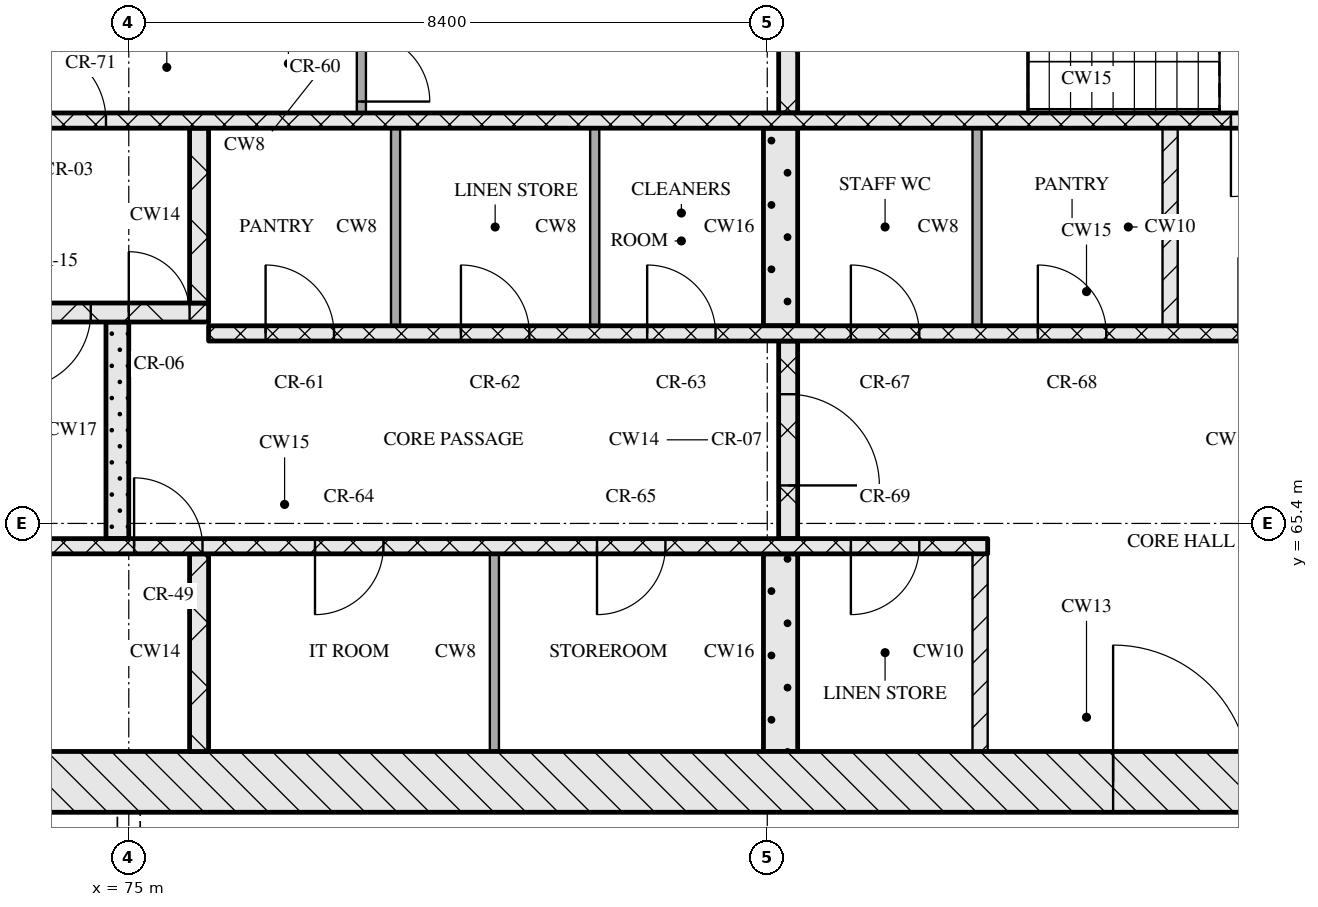
"""IFC4 building model, lengths in metres.
Left out: names, types, materials, properties, quantities, classifications, styles, units other than length and angle.
Written with IfcOpenShell. Run it as: python <this file> out.ifc"""

import sys

from ifc_helpers import new_model, si_unit, direction, frame, frame_2d, origin, place, context, subcontext, project, spatial, rectangle, extrude, element, fill, save


model = new_model("IFC4")
c1 = context("Model", 3, precision=1e-05, world=origin(), true_north=direction((0.0, 1.0)))
c2 = subcontext(c1, "Body", "Model", "MODEL_VIEW")
j1 = project(units=[si_unit("LENGTHUNIT", "METRE"), si_unit("PLANEANGLEUNIT", "RADIAN")], contexts=[c1])
p1 = place(None, origin())
s1 = spatial("IfcSite", under=j1, at=p1, CompositionType="ELEMENT")
p2 = place(p1, origin())
s2 = spatial("IfcBuilding", under=s1, at=p2, CompositionType="ELEMENT")
p3 = place(p2, frame((0.0, 0.0, 183.45)))
s3 = spatial("IfcBuildingStorey", under=s2, at=p3, CompositionType="ELEMENT", Elevation=183.45)
p4 = place(p3, frame((67.0, 62.0, 0.0), z_axis=(0.0, 0.0, 1.0), x_axis=(1.0, 0.0, 0.0)))
e1 = element("IfcWall", 1, at=p4, inside=s3, PredefinedType="SOLIDWALL", context=c2, shape_type="SweptSolid", body=[
    extrude(rectangle(XDim=41.2, YDim=0.8, at=frame_2d((20.6, 0.0))), origin(), (0.0, 0.0, 1.0), 3.32),
])
p5 = place(p4, frame((20.95, 0.0, 0.0)))
e2 = element("IfcOpeningElement", 2, at=p5, cuts=e1, PredefinedType="OPENING", context=c2, shape_type="SweptSolid", body=[
    extrude(rectangle(XDim=1.8, YDim=2.1, at=frame_2d((0.9, 1.05))), frame((0.0, 0.41, 0.0), z_axis=(0.0, -1.0, 0.0), x_axis=(1.0, 0.0, 0.0)), (0.0, 0.0, 1.0), 0.82),
])
p6 = place(p3, frame((75.925, 62.4, 0.0), z_axis=(0.0, 0.0, 1.0), x_axis=(0.0, 1.0, 0.0)))
e3 = element("IfcWall", 3, at=p6, inside=s3, PredefinedType="SOLIDWALL", context=c2, shape_type="SweptSolid", body=[
    extrude(rectangle(XDim=2.6, YDim=0.25, at=frame_2d((1.3, 0.0))), origin(), (0.0, 0.0, 1.0), 3.32),
])
p7 = place(p3, frame((79.81, 62.4, 0.0), z_axis=(0.0, 0.0, 1.0), x_axis=(0.0, 1.0, 0.0)))
e4 = element("IfcWall", 4, at=p7, inside=s3, PredefinedType="PARTITIONING", context=c2, shape_type="SweptSolid", body=[
    extrude(rectangle(XDim=2.6, YDim=0.12, at=frame_2d((1.3, 0.0))), origin(), (0.0, 0.0, 1.0), 3.32),
])
p8 = place(p3, frame((83.575, 62.4, 0.0), z_axis=(0.0, 0.0, 1.0), x_axis=(0.0, 1.0, 0.0)))
e5 = element("IfcWall", 5, at=p8, inside=s3, PredefinedType="SOLIDWALL", context=c2, shape_type="SweptSolid", body=[
    extrude(rectangle(XDim=2.6, YDim=0.45, at=frame_2d((1.3, 0.0))), origin(), (0.0, 0.0, 1.0), 3.32),
])
p9 = place(p3, frame((86.2, 62.4, 0.0), z_axis=(0.0, 0.0, 1.0), x_axis=(0.0, 1.0, 0.0)))
e6 = element("IfcWall", 6, at=p9, inside=s3, PredefinedType="PARTITIONING", context=c2, shape_type="SweptSolid", body=[
    extrude(rectangle(XDim=2.6, YDim=0.2, at=frame_2d((1.3, 0.0))), origin(), (0.0, 0.0, 1.0), 3.32),
])
p10 = place(p3, frame((67.8, 65.1, 0.0), z_axis=(0.0, 0.0, 1.0), x_axis=(1.0, 0.0, 0.0)))
e7 = element("IfcWall", 7, at=p10, inside=s3, PredefinedType="SOLIDWALL", context=c2, shape_type="SweptSolid", body=[
    extrude(rectangle(XDim=18.5, YDim=0.2, at=frame_2d((9.25, 0.0))), origin(), (0.0, 0.0, 1.0), 3.32),
])
p11 = place(p10, frame((7.27, 0.0, 0.0)))
e8 = element("IfcOpeningElement", 8, at=p11, cuts=e7, PredefinedType="OPENING", context=c2, shape_type="SweptSolid", body=[
    extrude(rectangle(XDim=0.9, YDim=2.1, at=frame_2d((0.45, 1.05))), frame((0.0, 0.11, 0.0), z_axis=(0.0, -1.0, 0.0), x_axis=(1.0, 0.0, 0.0)), (0.0, 0.0, 1.0), 0.22),
])
p12 = place(p10, frame((9.65, 0.0, 0.0)))
e9 = element("IfcOpeningElement", 9, at=p12, cuts=e7, PredefinedType="OPENING", context=c2, shape_type="SweptSolid", body=[
    extrude(rectangle(XDim=0.9, YDim=2.1, at=frame_2d((0.45, 1.05))), frame((0.0, 0.11, 0.0), z_axis=(0.0, -1.0, 0.0), x_axis=(1.0, 0.0, 0.0)), (0.0, 0.0, 1.0), 0.22),
])
p13 = place(p10, frame((13.36, 0.0, 0.0)))
e10 = element("IfcOpeningElement", 10, at=p13, cuts=e7, PredefinedType="OPENING", context=c2, shape_type="SweptSolid", body=[
    extrude(rectangle(XDim=0.9, YDim=2.1, at=frame_2d((0.45, 1.05))), frame((0.0, 0.11, 0.0), z_axis=(0.0, -1.0, 0.0), x_axis=(1.0, 0.0, 0.0)), (0.0, 0.0, 1.0), 0.22),
])
p14 = place(p10, frame((16.7, 0.0, 0.0)))
e11 = element("IfcOpeningElement", 11, at=p14, cuts=e7, PredefinedType="OPENING", context=c2, shape_type="SweptSolid", body=[
    extrude(rectangle(XDim=0.9, YDim=2.1, at=frame_2d((0.45, 1.05))), frame((0.0, 0.11, 0.0), z_axis=(0.0, -1.0, 0.0), x_axis=(1.0, 0.0, 0.0)), (0.0, 0.0, 1.0), 0.22),
])
p15 = place(p3, frame((74.85, 65.2, 0.0), z_axis=(0.0, 0.0, 1.0), x_axis=(0.0, 1.0, 0.0)))
e12 = element("IfcWall", 12, at=p15, inside=s3, PredefinedType="SOLIDWALL", context=c2, shape_type="SweptSolid", body=[
    extrude(rectangle(XDim=2.85, YDim=0.3, at=frame_2d((1.425, 0.0))), origin(), (0.0, 0.0, 1.0), 3.32),
])
p16 = place(p3, frame((83.675, 65.2, 0.0), z_axis=(0.0, 0.0, 1.0), x_axis=(0.0, 1.0, 0.0)))
e13 = element("IfcWall", 13, at=p16, inside=s3, PredefinedType="SOLIDWALL", context=c2, shape_type="SweptSolid", body=[
    extrude(rectangle(XDim=2.6, YDim=0.25, at=frame_2d((1.3, 0.0))), origin(), (0.0, 0.0, 1.0), 3.32),
])
p17 = place(p16, frame((0.7, 0.0, 0.0)))
e14 = element("IfcOpeningElement", 14, at=p17, cuts=e13, PredefinedType="OPENING", context=c2, shape_type="SweptSolid", body=[
    extrude(rectangle(XDim=1.2, YDim=2.1, at=frame_2d((0.6, 1.05))), frame((0.0, 0.135, 0.0), z_axis=(0.0, -1.0, 0.0), x_axis=(1.0, 0.0, 0.0)), (0.0, 0.0, 1.0), 0.27),
])
p18 = place(p3, frame((76.05, 67.9, 0.0), z_axis=(0.0, 0.0, 1.0), x_axis=(1.0, 0.0, 0.0)))
e15 = element("IfcWall", 15, at=p18, inside=s3, PredefinedType="SOLIDWALL", context=c2, shape_type="SweptSolid", body=[
    extrude(rectangle(XDim=23.1, YDim=0.2, at=frame_2d((11.55, 0.0))), origin(), (0.0, 0.0, 1.0), 3.32),
])
p19 = place(p18, frame((0.75, 0.0, 0.0)))
e16 = element("IfcOpeningElement", 16, at=p19, cuts=e15, PredefinedType="OPENING", context=c2, shape_type="SweptSolid", body=[
    extrude(rectangle(XDim=0.9, YDim=2.1, at=frame_2d((0.45, 1.05))), frame((0.0, 0.11, 0.0), z_axis=(0.0, -1.0, 0.0), x_axis=(1.0, 0.0, 0.0)), (0.0, 0.0, 1.0), 0.22),
])
p20 = place(p18, frame((3.32, 0.0, 0.0)))
e17 = element("IfcOpeningElement", 17, at=p20, cuts=e15, PredefinedType="OPENING", context=c2, shape_type="SweptSolid", body=[
    extrude(rectangle(XDim=0.9, YDim=2.1, at=frame_2d((0.45, 1.05))), frame((0.0, 0.11, 0.0), z_axis=(0.0, -1.0, 0.0), x_axis=(1.0, 0.0, 0.0)), (0.0, 0.0, 1.0), 0.22),
])
p21 = place(p18, frame((5.77, 0.0, 0.0)))
e18 = element("IfcOpeningElement", 18, at=p21, cuts=e15, PredefinedType="OPENING", context=c2, shape_type="SweptSolid", body=[
    extrude(rectangle(XDim=0.9, YDim=2.1, at=frame_2d((0.45, 1.05))), frame((0.0, 0.11, 0.0), z_axis=(0.0, -1.0, 0.0), x_axis=(1.0, 0.0, 0.0)), (0.0, 0.0, 1.0), 0.22),
])
p22 = place(p18, frame((8.45, 0.0, 0.0)))
e19 = element("IfcOpeningElement", 19, at=p22, cuts=e15, PredefinedType="OPENING", context=c2, shape_type="SweptSolid", body=[
    extrude(rectangle(XDim=0.9, YDim=2.1, at=frame_2d((0.45, 1.05))), frame((0.0, 0.11, 0.0), z_axis=(0.0, -1.0, 0.0), x_axis=(1.0, 0.0, 0.0)), (0.0, 0.0, 1.0), 0.22),
])
p23 = place(p18, frame((10.91, 0.0, 0.0)))
e20 = element("IfcOpeningElement", 20, at=p23, cuts=e15, PredefinedType="OPENING", context=c2, shape_type="SweptSolid", body=[
    extrude(rectangle(XDim=0.9, YDim=2.1, at=frame_2d((0.45, 1.05))), frame((0.0, 0.11, 0.0), z_axis=(0.0, -1.0, 0.0), x_axis=(1.0, 0.0, 0.0)), (0.0, 0.0, 1.0), 0.22),
])
p24 = place(p18, frame((13.55, 0.0, 0.0)))
e21 = element("IfcOpeningElement", 21, at=p24, cuts=e15, PredefinedType="OPENING", context=c2, shape_type="SweptSolid", body=[
    extrude(rectangle(XDim=1.0, YDim=2.1, at=frame_2d((0.5, 1.05))), frame((0.0, 0.11, 0.0), z_axis=(0.0, -1.0, 0.0), x_axis=(1.0, 0.0, 0.0)), (0.0, 0.0, 1.0), 0.22),
])
p25 = place(p18, frame((16.2, 0.0, 0.0)))
e22 = element("IfcOpeningElement", 22, at=p25, cuts=e15, PredefinedType="OPENING", context=c2, shape_type="SweptSolid", body=[
    extrude(rectangle(XDim=1.1, YDim=2.1, at=frame_2d((0.55, 1.05))), frame((0.0, 0.11, 0.0), z_axis=(0.0, -1.0, 0.0), x_axis=(1.0, 0.0, 0.0)), (0.0, 0.0, 1.0), 0.22),
])
p26 = place(p18, frame((18.7, 0.0, 0.0)))
e23 = element("IfcOpeningElement", 23, at=p26, cuts=e15, PredefinedType="OPENING", context=c2, shape_type="SweptSolid", body=[
    extrude(rectangle(XDim=1.1, YDim=2.1, at=frame_2d((0.55, 1.05))), frame((0.0, 0.11, 0.0), z_axis=(0.0, -1.0, 0.0), x_axis=(1.0, 0.0, 0.0)), (0.0, 0.0, 1.0), 0.22),
])
p27 = place(p18, frame((21.2, 0.0, 0.0)))
e24 = element("IfcOpeningElement", 24, at=p27, cuts=e15, PredefinedType="OPENING", context=c2, shape_type="SweptSolid", body=[
    extrude(rectangle(XDim=1.1, YDim=2.1, at=frame_2d((0.55, 1.05))), frame((0.0, 0.11, 0.0), z_axis=(0.0, -1.0, 0.0), x_axis=(1.0, 0.0, 0.0)), (0.0, 0.0, 1.0), 0.22),
])
for number, where, z_axis, x_axis in (
    (25, (78.51, 68.0, 0.0), (0.0, 0.0, 1.0), (0.0, 1.0, 0.0)),
    (26, (81.13, 68.0, 0.0), (0.0, 0.0, 1.0), (0.0, 1.0, 0.0)),
):
    element("IfcWall", number, at=place(p3, frame(where, z_axis=z_axis, x_axis=x_axis)), inside=s3, PredefinedType="PARTITIONING", context=c2, shape_type="SweptSolid", body=[
        extrude(rectangle(XDim=2.6, YDim=0.12, at=frame_2d((1.3, 0.0))), origin(), (0.0, 0.0, 1.0), 3.32),
    ])
p28 = place(p3, frame((83.575, 68.0, 0.0), z_axis=(0.0, 0.0, 1.0), x_axis=(0.0, 1.0, 0.0)))
e27 = element("IfcWall", 27, at=p28, inside=s3, PredefinedType="SOLIDWALL", context=c2, shape_type="SweptSolid", body=[
    extrude(rectangle(XDim=2.6, YDim=0.45, at=frame_2d((1.3, 0.0))), origin(), (0.0, 0.0, 1.0), 3.32),
])
p29 = place(p3, frame((86.16, 68.0, 0.0), z_axis=(0.0, 0.0, 1.0), x_axis=(0.0, 1.0, 0.0)))
e28 = element("IfcWall", 28, at=p29, inside=s3, PredefinedType="PARTITIONING", context=c2, shape_type="SweptSolid", body=[
    extrude(rectangle(XDim=2.6, YDim=0.12, at=frame_2d((1.3, 0.0))), origin(), (0.0, 0.0, 1.0), 3.32),
])
p30 = place(p3, frame((88.7, 68.0, 0.0), z_axis=(0.0, 0.0, 1.0), x_axis=(0.0, 1.0, 0.0)))
e29 = element("IfcWall", 29, at=p30, inside=s3, PredefinedType="PARTITIONING", context=c2, shape_type="SweptSolid", body=[
    extrude(rectangle(XDim=2.6, YDim=0.2, at=frame_2d((1.3, 0.0))), origin(), (0.0, 0.0, 1.0), 3.32),
])
p31 = place(p3, frame((67.8, 68.175, 0.0), z_axis=(0.0, 0.0, 1.0), x_axis=(1.0, 0.0, 0.0)))
e30 = element("IfcWall", 30, at=p31, inside=s3, PredefinedType="SOLIDWALL", context=c2, shape_type="SweptSolid", body=[
    extrude(rectangle(XDim=8.25, YDim=0.25, at=frame_2d((4.125, 0.0))), origin(), (0.0, 0.0, 1.0), 3.32),
])
p32 = place(p31, frame((5.7, 0.0, 0.0)))
e31 = element("IfcOpeningElement", 31, at=p32, cuts=e30, PredefinedType="OPENING", context=c2, shape_type="SweptSolid", body=[
    extrude(rectangle(XDim=1.0, YDim=2.1, at=frame_2d((0.5, 1.05))), frame((0.0, 0.135, 0.0), z_axis=(0.0, -1.0, 0.0), x_axis=(1.0, 0.0, 0.0)), (0.0, 0.0, 1.0), 0.27),
])
p33 = place(p31, frame((7.2, 0.0, 0.0)))
e32 = element("IfcOpeningElement", 32, at=p33, cuts=e30, PredefinedType="OPENING", context=c2, shape_type="SweptSolid", body=[
    extrude(rectangle(XDim=0.8, YDim=2.1, at=frame_2d((0.4, 1.05))), frame((0.0, 0.135, 0.0), z_axis=(0.0, -1.0, 0.0), x_axis=(1.0, 0.0, 0.0)), (0.0, 0.0, 1.0), 0.27),
])
p34 = place(p3, frame((75.925, 68.3, 0.0), z_axis=(0.0, 0.0, 1.0), x_axis=(0.0, 1.0, 0.0)))
e33 = element("IfcWall", 33, at=p34, inside=s3, PredefinedType="SOLIDWALL", context=c2, shape_type="SweptSolid", body=[
    extrude(rectangle(XDim=2.3, YDim=0.25, at=frame_2d((1.15, 0.0))), origin(), (0.0, 0.0, 1.0), 3.32),
])
p35 = place(p3, frame((67.8, 70.7, 0.0), z_axis=(0.0, 0.0, 1.0), x_axis=(1.0, 0.0, 0.0)))
e34 = element("IfcWall", 34, at=p35, inside=s3, PredefinedType="SOLIDWALL", context=c2, shape_type="SweptSolid", body=[
    extrude(rectangle(XDim=39.6, YDim=0.2, at=frame_2d((19.8, 0.0))), origin(), (0.0, 0.0, 1.0), 3.32),
])
p36 = place(p35, frame((0.65, 0.0, 0.0)))
e35 = element("IfcOpeningElement", 35, at=p36, cuts=e34, PredefinedType="OPENING", context=c2, shape_type="SweptSolid", body=[
    extrude(rectangle(XDim=1.1, YDim=2.1, at=frame_2d((0.55, 1.05))), frame((0.0, 0.11, 0.0), z_axis=(0.0, -1.0, 0.0), x_axis=(1.0, 0.0, 0.0)), (0.0, 0.0, 1.0), 0.22),
])
p37 = place(p35, frame((3.25, 0.0, 0.0)))
e36 = element("IfcOpeningElement", 36, at=p37, cuts=e34, PredefinedType="OPENING", context=c2, shape_type="SweptSolid", body=[
    extrude(rectangle(XDim=1.1, YDim=2.1, at=frame_2d((0.55, 1.05))), frame((0.0, 0.11, 0.0), z_axis=(0.0, -1.0, 0.0), x_axis=(1.0, 0.0, 0.0)), (0.0, 0.0, 1.0), 0.22),
])
p38 = place(p35, frame((5.9, 0.0, 0.0)))
e37 = element("IfcOpeningElement", 37, at=p38, cuts=e34, PredefinedType="OPENING", context=c2, shape_type="SweptSolid", body=[
    extrude(rectangle(XDim=1.0, YDim=2.1, at=frame_2d((0.5, 1.05))), frame((0.0, 0.11, 0.0), z_axis=(0.0, -1.0, 0.0), x_axis=(1.0, 0.0, 0.0)), (0.0, 0.0, 1.0), 0.22),
])
p39 = place(p35, frame((21.7, 0.0, 0.0)))
e38 = element("IfcOpeningElement", 38, at=p39, cuts=e34, PredefinedType="OPENING", context=c2, shape_type="SweptSolid", body=[
    extrude(rectangle(XDim=1.0, YDim=2.1, at=frame_2d((0.5, 1.05))), frame((0.0, 0.11, 0.0), z_axis=(0.0, -1.0, 0.0), x_axis=(1.0, 0.0, 0.0)), (0.0, 0.0, 1.0), 0.22),
])
p40 = place(p35, frame((32.7, 0.0, 0.0)))
e39 = element("IfcOpeningElement", 39, at=p40, cuts=e34, PredefinedType="OPENING", context=c2, shape_type="SweptSolid", body=[
    extrude(rectangle(XDim=1.0, YDim=2.1, at=frame_2d((0.5, 1.05))), frame((0.0, 0.11, 0.0), z_axis=(0.0, -1.0, 0.0), x_axis=(1.0, 0.0, 0.0)), (0.0, 0.0, 1.0), 0.22),
])
p41 = place(p35, frame((35.25, 0.0, 0.0)))
e40 = element("IfcOpeningElement", 40, at=p41, cuts=e34, PredefinedType="OPENING", context=c2, shape_type="SweptSolid", body=[
    extrude(rectangle(XDim=1.1, YDim=2.1, at=frame_2d((0.55, 1.05))), frame((0.0, 0.11, 0.0), z_axis=(0.0, -1.0, 0.0), x_axis=(1.0, 0.0, 0.0)), (0.0, 0.0, 1.0), 0.22),
])
p42 = place(p35, frame((37.85, 0.0, 0.0)))
e41 = element("IfcOpeningElement", 41, at=p42, cuts=e34, PredefinedType="OPENING", context=c2, shape_type="SweptSolid", body=[
    extrude(rectangle(XDim=1.1, YDim=2.1, at=frame_2d((0.55, 1.05))), frame((0.0, 0.11, 0.0), z_axis=(0.0, -1.0, 0.0), x_axis=(1.0, 0.0, 0.0)), (0.0, 0.0, 1.0), 0.22),
])
p43 = place(p3, frame((78.06, 70.8, 0.0), z_axis=(0.0, 0.0, 1.0), x_axis=(0.0, 1.0, 0.0)))
e42 = element("IfcWall", 42, at=p43, inside=s3, PredefinedType="PARTITIONING", context=c2, shape_type="SweptSolid", body=[
    extrude(rectangle(XDim=1.2, YDim=0.12, at=frame_2d((0.6, 0.0))), origin(), (0.0, 0.0, 1.0), 3.32),
])
p44 = place(p43, frame((0.15, 0.0, 0.0)))
e43 = element("IfcOpeningElement", 43, at=p44, cuts=e42, PredefinedType="OPENING", context=c2, shape_type="SweptSolid", body=[
    extrude(rectangle(XDim=0.9, YDim=2.1, at=frame_2d((0.45, 1.05))), frame((0.0, 0.07, 0.0), z_axis=(0.0, -1.0, 0.0), x_axis=(1.0, 0.0, 0.0)), (0.0, 0.0, 1.0), 0.14),
])
p45 = place(p3, frame((83.675, 70.8, 0.0), z_axis=(0.0, 0.0, 1.0), x_axis=(0.0, 1.0, 0.0)))
e44 = element("IfcWall", 44, at=p45, inside=s3, PredefinedType="SOLIDWALL", context=c2, shape_type="SweptSolid", body=[
    extrude(rectangle(XDim=2.95, YDim=0.25, at=frame_2d((1.475, 0.0))), origin(), (0.0, 0.0, 1.0), 3.32),
])
p46 = place(p5, origin())
e45 = element("IfcDoor", 45, at=p46, inside=s3, OperationType="DOUBLE_DOOR_SINGLE_SWING", PredefinedType="DOOR", context=c2, shape_type="SweptSolid", body=[
    extrude(rectangle(XDim=1.8, YDim=2.1, at=frame_2d((0.9, 1.05))), frame((0.0, 0.025, 0.0), z_axis=(0.0, -1.0, 0.0), x_axis=(1.0, 0.0, 0.0)), (0.0, 0.0, 1.0), 0.05),
])
fill(e2, e45)
p47 = place(p11, origin())
e46 = element("IfcDoor", 46, at=p47, inside=s3, OperationType="SINGLE_SWING_LEFT", PredefinedType="DOOR", context=c2, shape_type="SweptSolid", body=[
    extrude(rectangle(XDim=0.9, YDim=2.1, at=frame_2d((0.45, 1.05))), frame((0.0, 0.025, 0.0), z_axis=(0.0, -1.0, 0.0), x_axis=(1.0, 0.0, 0.0)), (0.0, 0.0, 1.0), 0.05),
])
fill(e8, e46)
p48 = place(p12, origin())
e47 = element("IfcDoor", 47, at=p48, inside=s3, OperationType="SINGLE_SWING_RIGHT", PredefinedType="DOOR", context=c2, shape_type="SweptSolid", body=[
    extrude(rectangle(XDim=0.9, YDim=2.1, at=frame_2d((0.45, 1.05))), frame((0.0, 0.025, 0.0), z_axis=(0.0, -1.0, 0.0), x_axis=(1.0, 0.0, 0.0)), (0.0, 0.0, 1.0), 0.05),
])
fill(e9, e47)
p49 = place(p13, origin())
e48 = element("IfcDoor", 48, at=p49, inside=s3, OperationType="SINGLE_SWING_RIGHT", PredefinedType="DOOR", context=c2, shape_type="SweptSolid", body=[
    extrude(rectangle(XDim=0.9, YDim=2.1, at=frame_2d((0.45, 1.05))), frame((0.0, 0.025, 0.0), z_axis=(0.0, -1.0, 0.0), x_axis=(1.0, 0.0, 0.0)), (0.0, 0.0, 1.0), 0.05),
])
fill(e10, e48)
p50 = place(p14, origin())
e49 = element("IfcDoor", 49, at=p50, inside=s3, OperationType="SINGLE_SWING_RIGHT", PredefinedType="DOOR", context=c2, shape_type="SweptSolid", body=[
    extrude(rectangle(XDim=0.9, YDim=2.1, at=frame_2d((0.45, 1.05))), frame((0.0, 0.025, 0.0), z_axis=(0.0, -1.0, 0.0), x_axis=(1.0, 0.0, 0.0)), (0.0, 0.0, 1.0), 0.05),
])
fill(e11, e49)
p51 = place(p17, origin())
e50 = element("IfcDoor", 50, at=p51, inside=s3, OperationType="SINGLE_SWING_RIGHT", PredefinedType="DOOR", context=c2, shape_type="SweptSolid", body=[
    extrude(rectangle(XDim=1.2, YDim=2.1, at=frame_2d((0.6, 1.05))), frame((0.0, 0.025, 0.0), z_axis=(0.0, -1.0, 0.0), x_axis=(1.0, 0.0, 0.0)), (0.0, 0.0, 1.0), 0.05),
])
fill(e14, e50)
p52 = place(p19, origin())
e51 = element("IfcDoor", 51, at=p52, inside=s3, OperationType="SINGLE_SWING_LEFT", PredefinedType="DOOR", context=c2, shape_type="SweptSolid", body=[
    extrude(rectangle(XDim=0.9, YDim=2.1, at=frame_2d((0.45, 1.05))), frame((0.0, 0.025, 0.0), z_axis=(0.0, -1.0, 0.0), x_axis=(1.0, 0.0, 0.0)), (0.0, 0.0, 1.0), 0.05),
])
fill(e16, e51)
p53 = place(p20, origin())
e52 = element("IfcDoor", 52, at=p53, inside=s3, OperationType="SINGLE_SWING_LEFT", PredefinedType="DOOR", context=c2, shape_type="SweptSolid", body=[
    extrude(rectangle(XDim=0.9, YDim=2.1, at=frame_2d((0.45, 1.05))), frame((0.0, 0.025, 0.0), z_axis=(0.0, -1.0, 0.0), x_axis=(1.0, 0.0, 0.0)), (0.0, 0.0, 1.0), 0.05),
])
fill(e17, e52)
p54 = place(p21, origin())
e53 = element("IfcDoor", 53, at=p54, inside=s3, OperationType="SINGLE_SWING_LEFT", PredefinedType="DOOR", context=c2, shape_type="SweptSolid", body=[
    extrude(rectangle(XDim=0.9, YDim=2.1, at=frame_2d((0.45, 1.05))), frame((0.0, 0.025, 0.0), z_axis=(0.0, -1.0, 0.0), x_axis=(1.0, 0.0, 0.0)), (0.0, 0.0, 1.0), 0.05),
])
fill(e18, e53)
p55 = place(p22, origin())
e54 = element("IfcDoor", 54, at=p55, inside=s3, OperationType="SINGLE_SWING_LEFT", PredefinedType="DOOR", context=c2, shape_type="SweptSolid", body=[
    extrude(rectangle(XDim=0.9, YDim=2.1, at=frame_2d((0.45, 1.05))), frame((0.0, 0.025, 0.0), z_axis=(0.0, -1.0, 0.0), x_axis=(1.0, 0.0, 0.0)), (0.0, 0.0, 1.0), 0.05),
])
fill(e19, e54)
p56 = place(p23, origin())
e55 = element("IfcDoor", 55, at=p56, inside=s3, OperationType="SINGLE_SWING_LEFT", PredefinedType="DOOR", context=c2, shape_type="SweptSolid", body=[
    extrude(rectangle(XDim=0.9, YDim=2.1, at=frame_2d((0.45, 1.05))), frame((0.0, 0.025, 0.0), z_axis=(0.0, -1.0, 0.0), x_axis=(1.0, 0.0, 0.0)), (0.0, 0.0, 1.0), 0.05),
])
fill(e20, e55)
p57 = place(p32, origin())
e56 = element("IfcDoor", 56, at=p57, inside=s3, OperationType="SINGLE_SWING_RIGHT", PredefinedType="DOOR", context=c2, shape_type="SweptSolid", body=[
    extrude(rectangle(XDim=1.0, YDim=2.1, at=frame_2d((0.5, 1.05))), frame((0.0, 0.025, 0.0), z_axis=(0.0, -1.0, 0.0), x_axis=(1.0, 0.0, 0.0)), (0.0, 0.0, 1.0), 0.05),
])
fill(e31, e56)
p58 = place(p33, origin())
e57 = element("IfcDoor", 57, at=p58, inside=s3, OperationType="SINGLE_SWING_LEFT", PredefinedType="DOOR", context=c2, shape_type="SweptSolid", body=[
    extrude(rectangle(XDim=0.8, YDim=2.1, at=frame_2d((0.4, 1.05))), frame((0.0, 0.025, 0.0), z_axis=(0.0, -1.0, 0.0), x_axis=(1.0, 0.0, 0.0)), (0.0, 0.0, 1.0), 0.05),
])
fill(e32, e57)
p59 = place(p38, origin())
e58 = element("IfcDoor", 58, at=p59, inside=s3, OperationType="SINGLE_SWING_LEFT", PredefinedType="DOOR", context=c2, shape_type="SweptSolid", body=[
    extrude(rectangle(XDim=1.0, YDim=2.1, at=frame_2d((0.5, 1.05))), frame((0.0, 0.025, 0.0), z_axis=(0.0, -1.0, 0.0), x_axis=(1.0, 0.0, 0.0)), (0.0, 0.0, 1.0), 0.05),
])
fill(e37, e58)
p60 = place(p39, origin())
e59 = element("IfcDoor", 59, at=p60, inside=s3, OperationType="SINGLE_SWING_RIGHT", PredefinedType="DOOR", context=c2, shape_type="SweptSolid", body=[
    extrude(rectangle(XDim=1.0, YDim=2.1, at=frame_2d((0.5, 1.05))), frame((0.0, 0.025, 0.0), z_axis=(0.0, -1.0, 0.0), x_axis=(1.0, 0.0, 0.0)), (0.0, 0.0, 1.0), 0.05),
])
fill(e38, e59)
p61 = place(p44, origin())
e60 = element("IfcDoor", 60, at=p61, inside=s3, OperationType="SINGLE_SWING_RIGHT", PredefinedType="DOOR", context=c2, shape_type="SweptSolid", body=[
    extrude(rectangle(XDim=0.9, YDim=2.1, at=frame_2d((0.45, 1.05))), frame((0.0, 0.025, 0.0), z_axis=(0.0, -1.0, 0.0), x_axis=(1.0, 0.0, 0.0)), (0.0, 0.0, 1.0), 0.05),
])
fill(e43, e60)
save(model, sys.argv[1])
